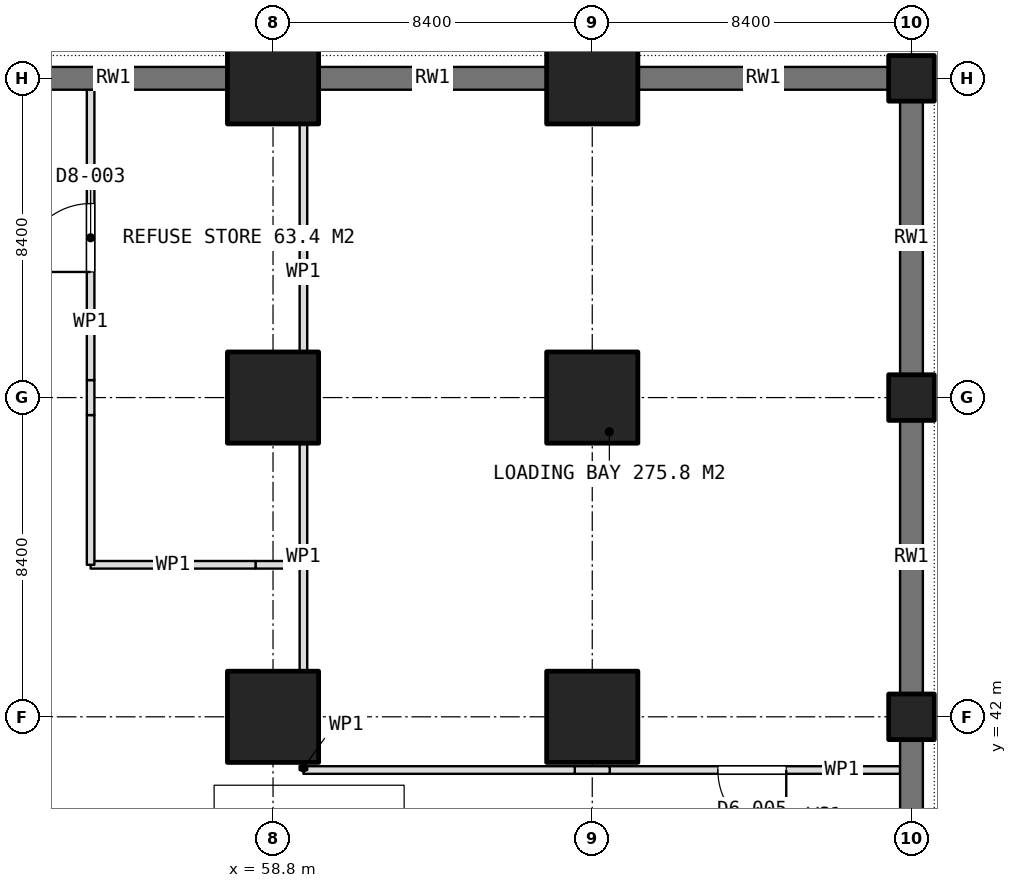
"""IFC4 building model, lengths in metres.
Left out: names, types, materials, properties, quantities, classifications, styles, units other than length and angle.
Written with IfcOpenShell. Run it as: python <this file> out.ifc"""

import sys

from ifc_helpers import new_model, si_unit, direction, frame, frame_2d, origin, origin_2d, place, context, subcontext, project, spatial, rectangle, extrude, element, fill, save


model = new_model("IFC4")
c1 = context("Model", 3, precision=1e-05, world=origin(), true_north=direction((0.0, 1.0)))
c2 = subcontext(c1, "Body", "Model", "MODEL_VIEW")
j1 = project(units=[si_unit("LENGTHUNIT", "METRE"), si_unit("PLANEANGLEUNIT", "RADIAN")], contexts=[c1])
p1 = place(None, origin())
s1 = spatial("IfcSite", under=j1, at=p1, CompositionType="ELEMENT")
p2 = place(p1, origin())
s2 = spatial("IfcBuilding", under=s1, at=p2, CompositionType="ELEMENT")
p3 = place(p2, frame((0.0, 0.0, -5.4)))
s3 = spatial("IfcBuildingStorey", under=s2, at=p3, CompositionType="ELEMENT", Elevation=-5.4)
for number, where, z_axis, x_axis in (
    (1, (58.8, 42.0, 0.0), (0.0, 0.0, 1.0), (1.0, 0.0, 0.0)),
    (2, (58.8, 50.4, 0.0), (0.0, 0.0, 1.0), (1.0, 0.0, 0.0)),
    (3, (58.8, 58.8, 0.0), (0.0, 0.0, 1.0), (1.0, 0.0, 0.0)),
    (4, (67.2, 42.0, 0.0), (0.0, 0.0, 1.0), (1.0, 0.0, 0.0)),
    (5, (67.2, 50.4, 0.0), (0.0, 0.0, 1.0), (1.0, 0.0, 0.0)),
    (6, (67.2, 58.8, 0.0), (0.0, 0.0, 1.0), (1.0, 0.0, 0.0)),
):
    element("IfcColumn", number, at=place(p3, frame(where, z_axis=z_axis, x_axis=x_axis)), inside=s3, PredefinedType="COLUMN", context=c2, shape_type="SweptSolid", body=[
        extrude(rectangle(XDim=2.4, YDim=2.4, at=origin_2d()), origin(), (0.0, 0.0, 1.0), 5.4),
    ])
for number, where, z_axis, x_axis in (
    (7, (75.6, 42.0, 0.0), (0.0, 0.0, 1.0), (1.0, 0.0, 0.0)),
    (8, (75.6, 50.4, 0.0), (0.0, 0.0, 1.0), (1.0, 0.0, 0.0)),
    (9, (75.6, 58.8, 0.0), (0.0, 0.0, 1.0), (1.0, 0.0, 0.0)),
):
    element("IfcColumn", number, at=place(p3, frame(where, z_axis=z_axis, x_axis=x_axis)), inside=s3, PredefinedType="COLUMN", context=c2, shape_type="SweptSolid", body=[
        extrude(rectangle(XDim=1.2, YDim=1.2, at=origin_2d()), origin(), (0.0, 0.0, 1.0), 5.4),
    ])
for number, where, z_axis, x_axis in (
    (10, (51.6, 58.8, 0.0), (0.0, 0.0, 1.0), (1.0, 0.0, 0.0)),
    (11, (60.0, 58.8, 0.0), (0.0, 0.0, 1.0), (1.0, 0.0, 0.0)),
):
    element("IfcWall", number, at=place(p3, frame(where, z_axis=z_axis, x_axis=x_axis)), inside=s3, PredefinedType="SOLIDWALL", context=c2, shape_type="SweptSolid", body=[
        extrude(rectangle(XDim=6.0, YDim=0.6, at=frame_2d((3.0, 0.0))), origin(), (0.0, 0.0, 1.0), 5.1),
    ])
p4 = place(p3, frame((68.4, 58.8, 0.0), z_axis=(0.0, 0.0, 1.0), x_axis=(1.0, 0.0, 0.0)))
e12 = element("IfcWall", 12, at=p4, inside=s3, PredefinedType="SOLIDWALL", context=c2, shape_type="SweptSolid", body=[
    extrude(rectangle(XDim=6.6, YDim=0.6, at=frame_2d((3.3, 0.0))), origin(), (0.0, 0.0, 1.0), 5.1),
])
for number, where, z_axis, x_axis in (
    (13, (75.6, 34.2, 0.0), (0.0, 0.0, 1.0), (0.0, 1.0, 0.0)),
    (14, (75.6, 42.6, 0.0), (0.0, 0.0, 1.0), (0.0, 1.0, 0.0)),
    (15, (75.6, 51.0, 0.0), (0.0, 0.0, 1.0), (0.0, 1.0, 0.0)),
):
    element("IfcWall", number, at=place(p3, frame(where, z_axis=z_axis, x_axis=x_axis)), inside=s3, PredefinedType="SOLIDWALL", context=c2, shape_type="SweptSolid", body=[
        extrude(rectangle(XDim=7.2, YDim=0.6, at=frame_2d((3.6, 0.0))), origin(), (0.0, 0.0, 1.0), 5.1),
    ])
p5 = place(p3, frame((75.3, 40.6, 0.0), z_axis=(0.0, 0.0, 1.0), x_axis=(-1.0, 0.0, 0.0)))
e16 = element("IfcWall", 16, at=p5, inside=s3, PredefinedType="PARTITIONING", context=c2, shape_type="SweptSolid", body=[
    extrude(rectangle(XDim=7.64, YDim=0.2, at=frame_2d((3.82, 0.0))), origin(), (0.0, 0.0, 1.0), 5.1),
])
p6 = place(p5, frame((2.995, 0.0, 0.0)))
e17 = element("IfcOpeningElement", 17, at=p6, cuts=e16, PredefinedType="OPENING", context=c2, shape_type="SweptSolid", body=[
    extrude(rectangle(XDim=1.8, YDim=2.1, at=frame_2d((0.9, 1.05))), frame((0.0, 0.11, 0.0), z_axis=(0.0, -1.0, 0.0), x_axis=(1.0, 0.0, 0.0)), (0.0, 0.0, 1.0), 0.22),
])
p7 = place(p3, frame((67.66, 40.6, 0.0), z_axis=(0.0, 0.0, 1.0), x_axis=(-1.0, 0.0, 0.0)))
e18 = element("IfcWall", 18, at=p7, inside=s3, PredefinedType="PARTITIONING", context=c2, shape_type="SweptSolid", body=[
    extrude(rectangle(XDim=0.92, YDim=0.2, at=frame_2d((0.46, 0.0))), origin(), (0.0, 0.0, 1.0), 3.3),
])
p8 = place(p3, frame((66.74, 40.6, 0.0), z_axis=(0.0, 0.0, 1.0), x_axis=(-1.0, 0.0, 0.0)))
e19 = element("IfcWall", 19, at=p8, inside=s3, PredefinedType="PARTITIONING", context=c2, shape_type="SweptSolid", body=[
    extrude(rectangle(XDim=7.14, YDim=0.2, at=frame_2d((3.57, 0.0))), origin(), (0.0, 0.0, 1.0), 5.1),
])
p9 = place(p3, frame((59.6, 40.6, 0.0), z_axis=(0.0, 0.0, 1.0), x_axis=(0.0, 1.0, 0.0)))
e20 = element("IfcWall", 20, at=p9, inside=s3, PredefinedType="PARTITIONING", context=c2, shape_type="SweptSolid", body=[
    extrude(rectangle(XDim=0.11, YDim=0.2, at=frame_2d((0.055, 0.0))), origin(), (0.0, 0.0, 1.0), 5.1),
])
for number, where, z_axis, x_axis in (
    (21, (59.6, 43.22, 0.0), (0.0, 0.0, 1.0), (0.0, 1.0, 0.0)),
    (22, (59.6, 51.62, 0.0), (0.0, 0.0, 1.0), (0.0, 1.0, 0.0)),
):
    element("IfcWall", number, at=place(p3, frame(where, z_axis=z_axis, x_axis=x_axis)), inside=s3, PredefinedType="PARTITIONING", context=c2, shape_type="SweptSolid", body=[
        extrude(rectangle(XDim=5.96, YDim=0.2, at=frame_2d((2.98, 0.0))), origin(), (0.0, 0.0, 1.0), 5.1),
    ])
p10 = place(p3, frame((59.5, 46.0, 0.0), z_axis=(0.0, 0.0, 1.0), x_axis=(-1.0, 0.0, 0.0)))
e23 = element("IfcWall", 23, at=p10, inside=s3, PredefinedType="PARTITIONING", context=c2, shape_type="SweptSolid", body=[
    extrude(rectangle(XDim=0.24, YDim=0.2, at=frame_2d((0.12, 0.0))), origin(), (0.0, 0.0, 1.0), 5.1),
])
p11 = place(p3, frame((59.26, 46.0, 0.0), z_axis=(0.0, 0.0, 1.0), x_axis=(-1.0, 0.0, 0.0)))
e24 = element("IfcWall", 24, at=p11, inside=s3, PredefinedType="PARTITIONING", context=c2, shape_type="SweptSolid", body=[
    extrude(rectangle(XDim=0.92, YDim=0.2, at=frame_2d((0.46, 0.0))), origin(), (0.0, 0.0, 1.0), 3.3),
])
p12 = place(p3, frame((58.34, 46.0, 0.0), z_axis=(0.0, 0.0, 1.0), x_axis=(-1.0, 0.0, 0.0)))
e25 = element("IfcWall", 25, at=p12, inside=s3, PredefinedType="PARTITIONING", context=c2, shape_type="SweptSolid", body=[
    extrude(rectangle(XDim=4.34, YDim=0.2, at=frame_2d((2.17, 0.0))), origin(), (0.0, 0.0, 1.0), 5.1),
])
p13 = place(p3, frame((54.0, 46.0, 0.0), z_axis=(0.0, 0.0, 1.0), x_axis=(0.0, 1.0, 0.0)))
e26 = element("IfcWall", 26, at=p13, inside=s3, PredefinedType="PARTITIONING", context=c2, shape_type="SweptSolid", body=[
    extrude(rectangle(XDim=3.94, YDim=0.2, at=frame_2d((1.97, 0.0))), origin(), (0.0, 0.0, 1.0), 5.1),
])
p14 = place(p3, frame((54.0, 49.94, 0.0), z_axis=(0.0, 0.0, 1.0), x_axis=(0.0, 1.0, 0.0)))
e27 = element("IfcWall", 27, at=p14, inside=s3, PredefinedType="PARTITIONING", context=c2, shape_type="SweptSolid", body=[
    extrude(rectangle(XDim=0.92, YDim=0.2, at=frame_2d((0.46, 0.0))), origin(), (0.0, 0.0, 1.0), 3.3),
])
p15 = place(p3, frame((54.0, 50.86, 0.0), z_axis=(0.0, 0.0, 1.0), x_axis=(0.0, 1.0, 0.0)))
e28 = element("IfcWall", 28, at=p15, inside=s3, PredefinedType="PARTITIONING", context=c2, shape_type="SweptSolid", body=[
    extrude(rectangle(XDim=7.64, YDim=0.2, at=frame_2d((3.82, 0.0))), origin(), (0.0, 0.0, 1.0), 5.1),
])
p16 = place(p15, frame((2.845, 0.0, 0.0)))
e29 = element("IfcOpeningElement", 29, at=p16, cuts=e28, PredefinedType="OPENING", context=c2, shape_type="SweptSolid", body=[
    extrude(rectangle(XDim=1.8, YDim=2.1, at=frame_2d((0.9, 1.05))), frame((0.0, 0.11, 0.0), z_axis=(0.0, -1.0, 0.0), x_axis=(1.0, 0.0, 0.0)), (0.0, 0.0, 1.0), 0.22),
])
p17 = place(p6, origin())
e30 = element("IfcDoor", 30, at=p17, inside=s3, OperationType="DOUBLE_DOOR_SINGLE_SWING", PredefinedType="DOOR", context=c2, shape_type="SweptSolid", body=[
    extrude(rectangle(XDim=1.8, YDim=2.1, at=frame_2d((0.9, 1.05))), frame((0.0, 0.025, 0.0), z_axis=(0.0, -1.0, 0.0), x_axis=(1.0, 0.0, 0.0)), (0.0, 0.0, 1.0), 0.05),
])
fill(e17, e30)
p18 = place(p16, origin())
e31 = element("IfcDoor", 31, at=p18, inside=s3, OperationType="DOUBLE_DOOR_SINGLE_SWING", PredefinedType="DOOR", context=c2, shape_type="SweptSolid", body=[
    extrude(rectangle(XDim=1.8, YDim=2.1, at=frame_2d((0.9, 1.05))), frame((0.0, 0.025, 0.0), z_axis=(0.0, -1.0, 0.0), x_axis=(1.0, 0.0, 0.0)), (0.0, 0.0, 1.0), 0.05),
])
fill(e29, e31)
save(model, sys.argv[1])
